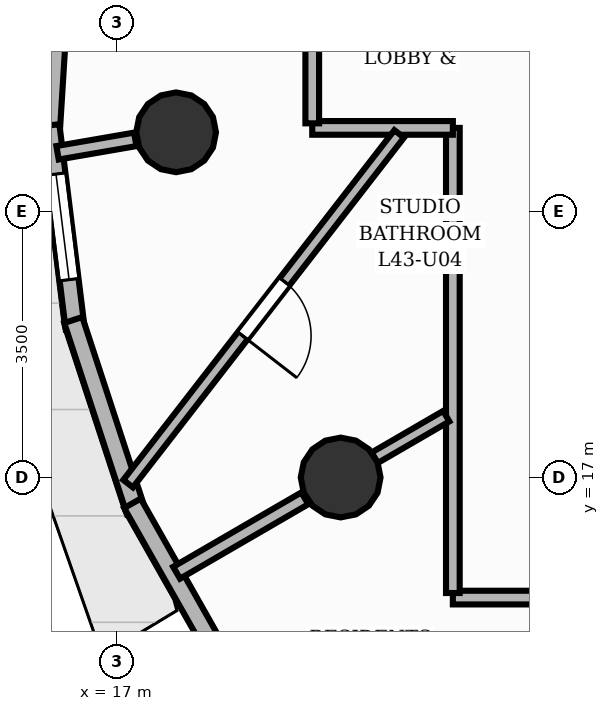
"""IFC4 building model, lengths in metres.
Left out: names, types, materials, properties, quantities, classifications, styles, units other than length and angle.
Written with IfcOpenShell. Run it as: python <this file> out.ifc"""

import sys

from ifc_helpers import new_model, si_unit, direction, frame, frame_2d, origin, origin_2d, place, context, subcontext, project, spatial, rectangle, circle, extrude, element, fill, save


model = new_model("IFC4")
c1 = context("Model", 3, precision=1e-05, world=origin(), true_north=direction((0.0, 1.0)))
c2 = subcontext(c1, "Body", "Model", "MODEL_VIEW")
j1 = project(units=[si_unit("LENGTHUNIT", "METRE"), si_unit("PLANEANGLEUNIT", "RADIAN")], contexts=[c1])
p1 = place(None, origin())
s1 = spatial("IfcSite", under=j1, at=p1, CompositionType="ELEMENT")
p2 = place(p1, origin())
s2 = spatial("IfcBuilding", under=s1, at=p2, CompositionType="ELEMENT")
p3 = place(p2, frame((0.0, 0.0, 145.76)))
s3 = spatial("IfcBuildingStorey", under=s2, at=p3, CompositionType="ELEMENT", Elevation=145.76)
for number, where, z_axis, x_axis in (
    (1, (17.779, 21.542, 0.0), (0.0, 0.0, 1.0), (1.0, 0.0, 0.0)),
    (2, (19.944, 17.0, 0.0), (0.0, 0.0, 1.0), (1.0, 0.0, 0.0)),
):
    element("IfcColumn", number, at=place(p3, frame(where, z_axis=z_axis, x_axis=x_axis)), inside=s3, PredefinedType="COLUMN", context=c2, shape_type="SweptSolid", body=[
        extrude(circle(Radius=0.525, at=origin_2d()), origin(), (0.0, 0.0, 1.0), 3.2),
    ])
p4 = place(p3, frame((16.122, 21.521, 0.0), z_axis=(0.0, 0.0, 1.0), x_axis=(0.062278868317, 0.998058787127, 0.0)))
e3 = element("IfcWall", 3, at=p4, inside=s3, PredefinedType="SOLIDWALL", context=c2, shape_type="SweptSolid", body=[
    extrude(rectangle(XDim=2.752, YDim=0.25, at=frame_2d((1.376, 0.0))), origin(), (0.0, 0.0, 1.0), 2.96),
])
p5 = place(p3, frame((16.451, 18.961, 0.0), z_axis=(0.0, 0.0, 1.0), x_axis=(-0.123197890413, 0.992382123881, 0.0)))
e4 = element("IfcWall", 4, at=p5, inside=s3, PredefinedType="SOLIDWALL", context=c2, shape_type="SweptSolid", body=[
    extrude(rectangle(XDim=2.693, YDim=0.25, at=frame_2d((1.347, 0.0))), origin(), (0.0, 0.0, 1.0), 2.96),
])
p6 = place(p5, frame((0.647, 0.0, 0.85)))
e5 = element("IfcOpeningElement", 5, at=p6, cuts=e4, PredefinedType="OPENING", context=c2, shape_type="SweptSolid", body=[
    extrude(rectangle(XDim=1.4, YDim=1.45, at=frame_2d((0.7, 0.725))), frame((0.0, 0.135, 0.0), z_axis=(0.0, -1.0, 0.0), x_axis=(1.0, 0.0, 0.0)), (0.0, 0.0, 1.0), 0.27),
])
p7 = place(p3, frame((17.251, 16.556, 0.0), z_axis=(0.0, 0.0, 1.0), x_axis=(-0.311522010952, 0.950238936633, 0.0)))
e6 = element("IfcWall", 6, at=p7, inside=s3, PredefinedType="SOLIDWALL", context=c2, shape_type="SweptSolid", body=[
    extrude(rectangle(XDim=2.648, YDim=0.25, at=frame_2d((1.324, 0.0))), origin(), (0.0, 0.0, 1.0), 2.96),
])
p8 = place(p3, frame((18.498, 14.377, 0.0), z_axis=(0.0, 0.0, 1.0), x_axis=(-0.492909281161, 0.870080709214, 0.0)))
e7 = element("IfcWall", 7, at=p8, inside=s3, PredefinedType="SOLIDWALL", context=c2, shape_type="SweptSolid", body=[
    extrude(rectangle(XDim=2.624, YDim=0.25, at=frame_2d((1.312, 0.0))), origin(), (0.0, 0.0, 1.0), 2.96),
])
p9 = place(p3, frame((17.242, 21.449, 0.0), z_axis=(0.0, 0.0, 1.0), x_axis=(-0.985390767806, -0.170308645474, 0.0)))
e8 = element("IfcWall", 8, at=p9, inside=s3, PredefinedType="PARTITIONING", context=c2, shape_type="SweptSolid", body=[
    extrude(rectangle(XDim=1.038, YDim=0.18, at=frame_2d((0.519, 0.0))), origin(), (0.0, 0.0, 1.0), 2.336),
])
p10 = place(p3, frame((19.472, 16.726, 0.0), z_axis=(0.0, 0.0, 1.0), x_axis=(-0.864802971131, -0.502111363268, 0.0)))
e9 = element("IfcWall", 9, at=p10, inside=s3, PredefinedType="PARTITIONING", context=c2, shape_type="SweptSolid", body=[
    extrude(rectangle(XDim=1.951, YDim=0.18, at=frame_2d((0.975, 0.0))), origin(), (0.0, 0.0, 1.0), 2.336),
])
p11 = place(p3, frame((39.08, 15.42, 0.0), z_axis=(0.0, 0.0, 1.0), x_axis=(-1.0, 0.0, 0.0)))
e10 = element("IfcWall", 10, at=p11, inside=s3, PredefinedType="PARTITIONING", context=c2, shape_type="SweptSolid", body=[
    extrude(rectangle(XDim=17.66, YDim=0.18, at=frame_2d((8.83, 0.0))), origin(), (0.0, 0.0, 1.0), 2.955),
])
p12 = place(p11, frame((7.368, 0.0, 0.0)))
e11 = element("IfcOpeningElement", 11, at=p12, cuts=e10, PredefinedType="OPENING", context=c2, shape_type="SweptSolid", body=[
    extrude(rectangle(XDim=0.9, YDim=2.1, at=frame_2d((0.45, 1.05))), frame((0.0, 0.1, 0.0), z_axis=(0.0, -1.0, 0.0), x_axis=(1.0, 0.0, 0.0)), (0.0, 0.0, 1.0), 0.2),
])
p13 = place(p11, frame((10.224, 0.0, 0.0)))
e12 = element("IfcOpeningElement", 12, at=p13, cuts=e10, PredefinedType="OPENING", context=c2, shape_type="SweptSolid", body=[
    extrude(rectangle(XDim=0.9, YDim=2.1, at=frame_2d((0.45, 1.05))), frame((0.0, 0.1, 0.0), z_axis=(0.0, -1.0, 0.0), x_axis=(1.0, 0.0, 0.0)), (0.0, 0.0, 1.0), 0.2),
])
p14 = place(p11, frame((14.353, 0.0, 0.0)))
e13 = element("IfcOpeningElement", 13, at=p14, cuts=e10, PredefinedType="OPENING", context=c2, shape_type="SweptSolid", body=[
    extrude(rectangle(XDim=0.9, YDim=2.1, at=frame_2d((0.45, 1.05))), frame((0.0, 0.1, 0.0), z_axis=(0.0, -1.0, 0.0), x_axis=(1.0, 0.0, 0.0)), (0.0, 0.0, 1.0), 0.2),
])
p15 = place(p3, frame((21.42, 15.48, 0.0), z_axis=(0.0, 0.0, 1.0), x_axis=(0.0, 1.0, 0.0)))
e14 = element("IfcWall", 14, at=p15, inside=s3, PredefinedType="PARTITIONING", context=c2, shape_type="SweptSolid", body=[
    extrude(rectangle(XDim=6.12, YDim=0.18, at=frame_2d((3.06, 0.0))), origin(), (0.0, 0.0, 1.0), 2.955),
])
p16 = place(p3, frame((21.42, 21.6, 0.0), z_axis=(0.0, 0.0, 1.0), x_axis=(-1.0, 0.0, 0.0)))
e15 = element("IfcWall", 15, at=p16, inside=s3, PredefinedType="PARTITIONING", context=c2, shape_type="SweptSolid", body=[
    extrude(rectangle(XDim=1.85, YDim=0.18, at=frame_2d((0.925, 0.0))), origin(), (0.0, 0.0, 1.0), 2.336),
])
p17 = place(p3, frame((19.57, 21.66, 0.0), z_axis=(0.0, 0.0, 1.0), x_axis=(0.0, 1.0, 0.0)))
e16 = element("IfcWall", 16, at=p17, inside=s3, PredefinedType="PARTITIONING", context=c2, shape_type="SweptSolid", body=[
    extrude(rectangle(XDim=4.74, YDim=0.18, at=frame_2d((2.37, 0.0))), origin(), (0.0, 0.0, 1.0), 2.955),
])
p18 = place(p3, frame((20.391, 17.26, 0.0), z_axis=(0.0, 0.0, 1.0), x_axis=(0.864719901707, 0.50225440923, 0.0)))
e17 = element("IfcWall", 17, at=p18, inside=s3, PredefinedType="PLUMBINGWALL", context=c2, shape_type="SweptSolid", body=[
    extrude(rectangle(XDim=1.09, YDim=0.16, at=frame_2d((0.545, 0.0))), origin(), (0.0, 0.0, 1.0), 2.336),
])
p19 = place(p3, frame((20.714, 21.521, 0.0), z_axis=(0.0, 0.0, 1.0), x_axis=(-0.612572320399, -0.790414544578, 0.0)))
e18 = element("IfcWall", 18, at=p19, inside=s3, PredefinedType="PLUMBINGWALL", context=c2, shape_type="SweptSolid", body=[
    extrude(rectangle(XDim=5.822, YDim=0.16, at=frame_2d((2.911, 0.0))), origin(), (0.0, 0.0, 1.0), 2.955),
])
p20 = place(p19, frame((2.461, 0.0, 0.0)))
e19 = element("IfcOpeningElement", 19, at=p20, cuts=e18, PredefinedType="OPENING", context=c2, shape_type="SweptSolid", body=[
    extrude(rectangle(XDim=0.9, YDim=2.1, at=frame_2d((0.45, 1.05))), frame((0.0, 0.09, 0.0), z_axis=(0.0, -1.0, 0.0), x_axis=(1.0, 0.0, 0.0)), (0.0, 0.0, 1.0), 0.18),
])
p21 = place(p6, origin())
e20 = element("IfcWindow", 20, at=p21, inside=s3, PartitioningType="SINGLE_PANEL", PredefinedType="WINDOW", context=c2, shape_type="SweptSolid", body=[
    extrude(rectangle(XDim=1.4, YDim=1.45, at=frame_2d((0.7, 0.725))), frame((0.0, 0.03, 0.0), z_axis=(0.0, -1.0, 0.0), x_axis=(1.0, 0.0, 0.0)), (0.0, 0.0, 1.0), 0.06),
])
fill(e5, e20)
p22 = place(p20, origin())
e21 = element("IfcDoor", 21, at=p22, inside=s3, OperationType="SINGLE_SWING_RIGHT", PredefinedType="DOOR", context=c2, shape_type="SweptSolid", body=[
    extrude(rectangle(XDim=0.9, YDim=2.1, at=frame_2d((0.45, 1.05))), frame((0.0, 0.025, 0.0), z_axis=(0.0, -1.0, 0.0), x_axis=(1.0, 0.0, 0.0)), (0.0, 0.0, 1.0), 0.05),
])
fill(e19, e21)
save(model, sys.argv[1])
